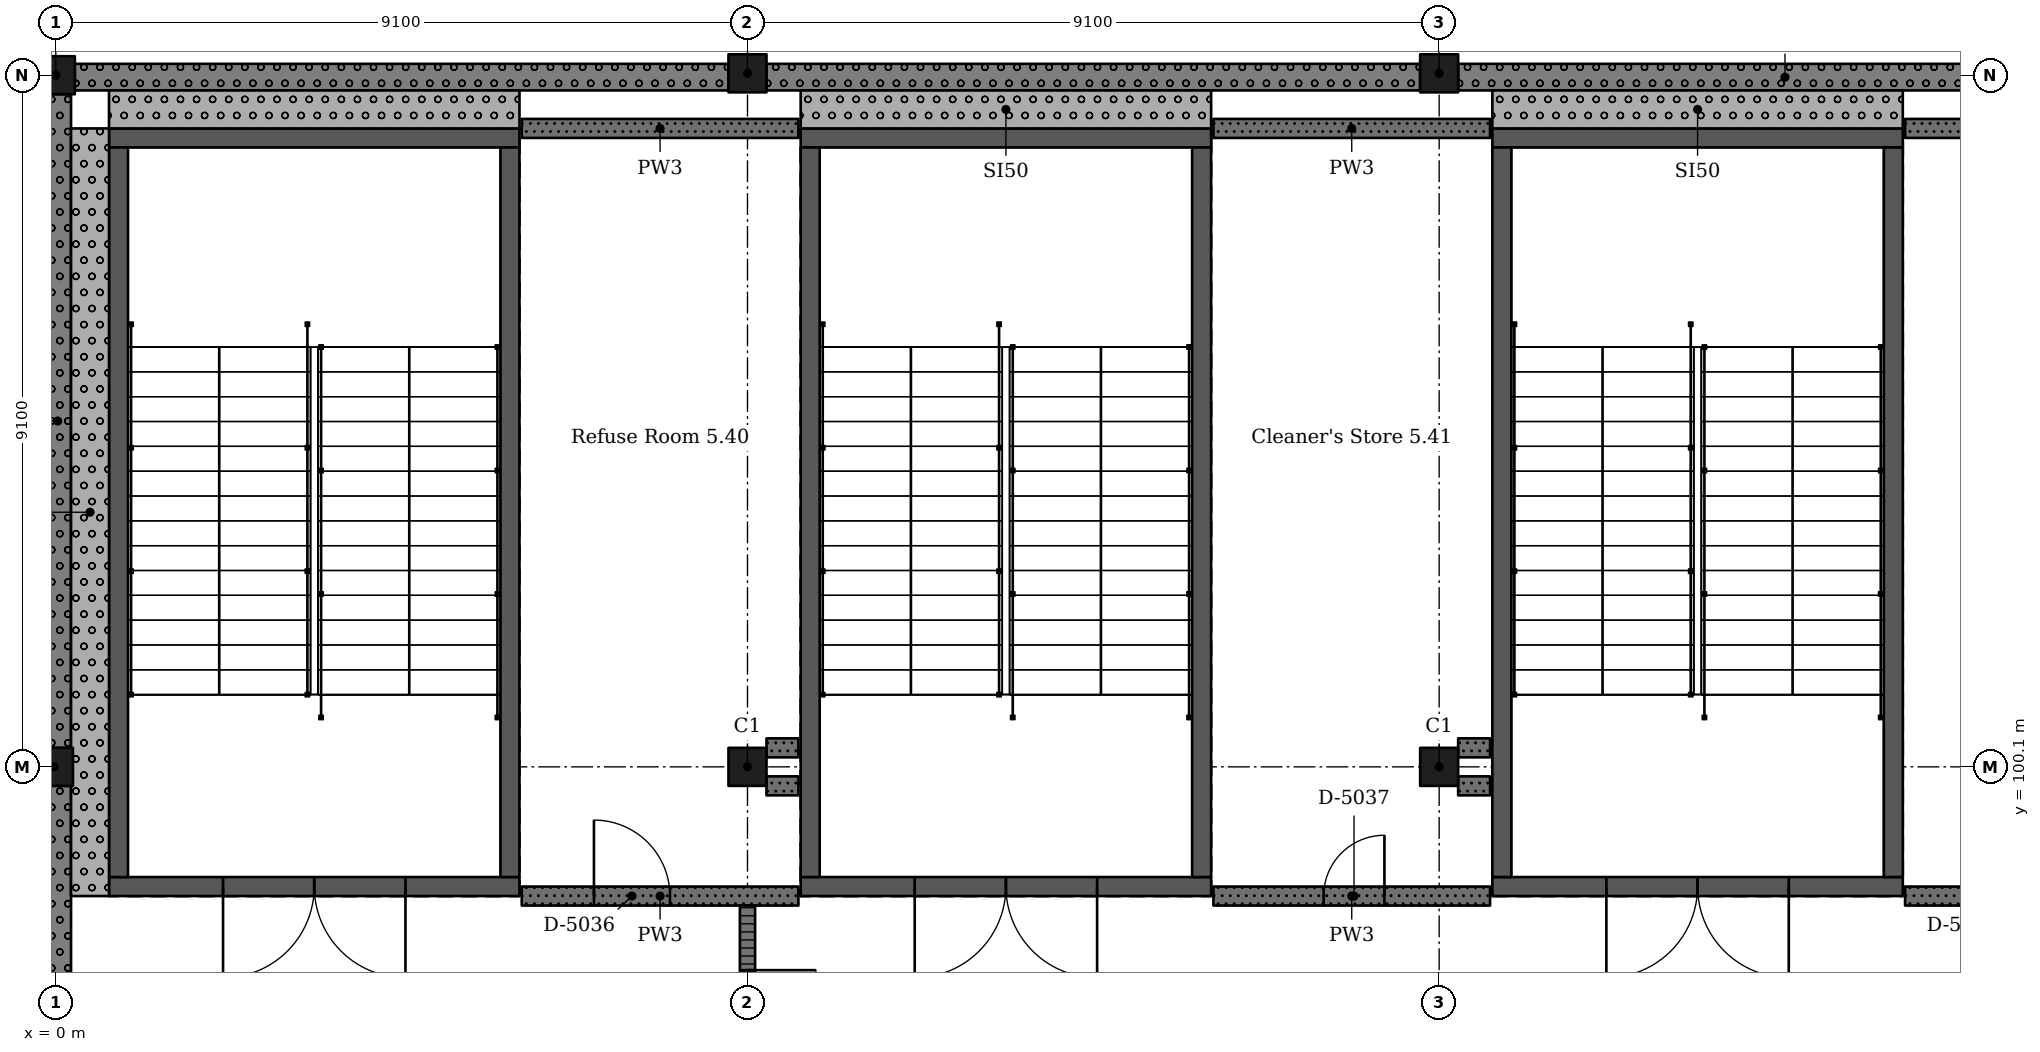
"""IFC4 building model, lengths in metres.
Left out: names, types, materials, properties, quantities, classifications, styles, units other than length and angle.
Written with IfcOpenShell. Run it as: python <this file> out.ifc"""

import sys

from ifc_helpers import new_model, si_unit, direction, frame, frame_2d, origin, origin_2d, place, context, subcontext, project, spatial, rectangle, extrude, element, fill, save


model = new_model("IFC4")
c1 = context("Model", 3, precision=1e-05, world=origin(), true_north=direction((0.0, 1.0)))
c2 = subcontext(c1, "Body", "Model", "MODEL_VIEW")
j1 = project(units=[si_unit("LENGTHUNIT", "METRE"), si_unit("PLANEANGLEUNIT", "RADIAN")], contexts=[c1])
p1 = place(None, origin())
s1 = spatial("IfcSite", under=j1, at=p1, CompositionType="ELEMENT")
p2 = place(p1, origin())
s2 = spatial("IfcBuilding", under=s1, at=p2, CompositionType="ELEMENT")
p3 = place(p2, frame((0.0, 0.0, 24.57)))
s3 = spatial("IfcBuildingStorey", under=s2, at=p3, CompositionType="ELEMENT", Elevation=24.57)
for number, where, z_axis, x_axis in (
    (1, (-0.025, 100.1, 0.0), (0.0, 0.0, 1.0), (1.0, 0.0, 0.0)),
    (2, (0.0, 109.2, 0.0), (0.0, 0.0, 1.0), (1.0, 0.0, 0.0)),
    (3, (9.1, 100.1, 0.0), (0.0, 0.0, 1.0), (1.0, 0.0, 0.0)),
    (4, (9.1, 109.225, 0.0), (0.0, 0.0, 1.0), (1.0, 0.0, 0.0)),
    (5, (18.2, 100.1, 0.0), (0.0, 0.0, 1.0), (1.0, 0.0, 0.0)),
    (6, (18.2, 109.225, 0.0), (0.0, 0.0, 1.0), (1.0, 0.0, 0.0)),
):
    element("IfcColumn", number, at=place(p3, frame(where, z_axis=z_axis, x_axis=x_axis)), inside=s3, PredefinedType="COLUMN", context=c2, shape_type="SweptSolid", body=[
        extrude(rectangle(XDim=0.5, YDim=0.5, at=origin_2d()), origin(), (0.0, 0.0, 1.0), 4.55),
    ])
p4 = place(p3, frame((6.1, 98.525, 0.0), z_axis=(0.0, 0.0, 1.0), x_axis=(-1.0, 0.0, 0.0)))
e7 = element("IfcWall", 7, at=p4, inside=s3, PredefinedType="SHEAR", context=c2, shape_type="SweptSolid", body=[
    extrude(rectangle(XDim=5.4, YDim=0.25, at=frame_2d((2.7, 0.0))), origin(), (0.0, 0.0, 1.0), 4.55),
])
p5 = place(p4, frame((1.5, 0.0, 0.0)))
e8 = element("IfcOpeningElement", 8, at=p5, cuts=e7, PredefinedType="OPENING", context=c2, shape_type="SweptSolid", body=[
    extrude(rectangle(XDim=2.4, YDim=2.1, at=frame_2d((1.2, 1.05))), frame((0.0, 0.135, 0.0), z_axis=(0.0, -1.0, 0.0), x_axis=(1.0, 0.0, 0.0)), (0.0, 0.0, 1.0), 0.27),
])
p6 = place(p3, frame((6.1, 108.375, 0.0), z_axis=(0.0, 0.0, 1.0), x_axis=(-1.0, 0.0, 0.0)))
e9 = element("IfcWall", 9, at=p6, inside=s3, PredefinedType="SHEAR", context=c2, shape_type="SweptSolid", body=[
    extrude(rectangle(XDim=5.4, YDim=0.25, at=frame_2d((2.7, 0.0))), origin(), (0.0, 0.0, 1.0), 4.55),
])
for number, where, z_axis, x_axis in (
    (10, (0.825, 108.25, 0.0), (0.0, 0.0, 1.0), (0.0, -1.0, 0.0)),
    (11, (5.975, 108.25, 0.0), (0.0, 0.0, 1.0), (0.0, -1.0, 0.0)),
):
    element("IfcWall", number, at=place(p3, frame(where, z_axis=z_axis, x_axis=x_axis)), inside=s3, PredefinedType="SHEAR", context=c2, shape_type="SweptSolid", body=[
        extrude(rectangle(XDim=9.6, YDim=0.25, at=frame_2d((4.8, 0.0))), origin(), (0.0, 0.0, 1.0), 4.55),
    ])
p7 = place(p3, frame((15.2, 98.525, 0.0), z_axis=(0.0, 0.0, 1.0), x_axis=(-1.0, 0.0, 0.0)))
e12 = element("IfcWall", 12, at=p7, inside=s3, PredefinedType="SHEAR", context=c2, shape_type="SweptSolid", body=[
    extrude(rectangle(XDim=5.4, YDim=0.25, at=frame_2d((2.7, 0.0))), origin(), (0.0, 0.0, 1.0), 4.55),
])
p8 = place(p7, frame((1.5, 0.0, 0.0)))
e13 = element("IfcOpeningElement", 13, at=p8, cuts=e12, PredefinedType="OPENING", context=c2, shape_type="SweptSolid", body=[
    extrude(rectangle(XDim=2.4, YDim=2.1, at=frame_2d((1.2, 1.05))), frame((0.0, 0.135, 0.0), z_axis=(0.0, -1.0, 0.0), x_axis=(1.0, 0.0, 0.0)), (0.0, 0.0, 1.0), 0.27),
])
p9 = place(p3, frame((15.2, 108.375, 0.0), z_axis=(0.0, 0.0, 1.0), x_axis=(-1.0, 0.0, 0.0)))
e14 = element("IfcWall", 14, at=p9, inside=s3, PredefinedType="SHEAR", context=c2, shape_type="SweptSolid", body=[
    extrude(rectangle(XDim=5.4, YDim=0.25, at=frame_2d((2.7, 0.0))), origin(), (0.0, 0.0, 1.0), 4.55),
])
for number, where, z_axis, x_axis in (
    (15, (9.925, 108.25, 0.0), (0.0, 0.0, 1.0), (0.0, -1.0, 0.0)),
    (16, (15.075, 108.25, 0.0), (0.0, 0.0, 1.0), (0.0, -1.0, 0.0)),
):
    element("IfcWall", number, at=place(p3, frame(where, z_axis=z_axis, x_axis=x_axis)), inside=s3, PredefinedType="SHEAR", context=c2, shape_type="SweptSolid", body=[
        extrude(rectangle(XDim=9.6, YDim=0.25, at=frame_2d((4.8, 0.0))), origin(), (0.0, 0.0, 1.0), 4.55),
    ])
p10 = place(p3, frame((24.3, 98.525, 0.0), z_axis=(0.0, 0.0, 1.0), x_axis=(-1.0, 0.0, 0.0)))
e17 = element("IfcWall", 17, at=p10, inside=s3, PredefinedType="SHEAR", context=c2, shape_type="SweptSolid", body=[
    extrude(rectangle(XDim=5.4, YDim=0.25, at=frame_2d((2.7, 0.0))), origin(), (0.0, 0.0, 1.0), 4.55),
])
p11 = place(p10, frame((1.5, 0.0, 0.0)))
e18 = element("IfcOpeningElement", 18, at=p11, cuts=e17, PredefinedType="OPENING", context=c2, shape_type="SweptSolid", body=[
    extrude(rectangle(XDim=2.4, YDim=2.1, at=frame_2d((1.2, 1.05))), frame((0.0, 0.135, 0.0), z_axis=(0.0, -1.0, 0.0), x_axis=(1.0, 0.0, 0.0)), (0.0, 0.0, 1.0), 0.27),
])
p12 = place(p3, frame((24.3, 108.375, 0.0), z_axis=(0.0, 0.0, 1.0), x_axis=(-1.0, 0.0, 0.0)))
e19 = element("IfcWall", 19, at=p12, inside=s3, PredefinedType="SHEAR", context=c2, shape_type="SweptSolid", body=[
    extrude(rectangle(XDim=5.4, YDim=0.25, at=frame_2d((2.7, 0.0))), origin(), (0.0, 0.0, 1.0), 4.55),
])
for number, where, z_axis, x_axis in (
    (20, (19.025, 108.25, 0.0), (0.0, 0.0, 1.0), (0.0, -1.0, 0.0)),
    (21, (24.175, 108.25, 0.0), (0.0, 0.0, 1.0), (0.0, -1.0, 0.0)),
):
    element("IfcWall", number, at=place(p3, frame(where, z_axis=z_axis, x_axis=x_axis)), inside=s3, PredefinedType="SHEAR", context=c2, shape_type="SweptSolid", body=[
        extrude(rectangle(XDim=9.6, YDim=0.25, at=frame_2d((4.8, 0.0))), origin(), (0.0, 0.0, 1.0), 4.55),
    ])
p13 = place(p3, frame((27.05, 109.175, 0.0), z_axis=(0.0, 0.0, 1.0), x_axis=(-1.0, 0.0, 0.0)))
e22 = element("IfcWall", 22, at=p13, inside=s3, PredefinedType="SOLIDWALL", context=c2, shape_type="SweptSolid", body=[
    extrude(rectangle(XDim=8.6, YDim=0.35, at=frame_2d((4.3, 0.0))), origin(), (0.0, 0.0, 1.0), 3.6),
])
p14 = place(p3, frame((17.95, 109.175, 0.0), z_axis=(0.0, 0.0, 1.0), x_axis=(-1.0, 0.0, 0.0)))
e23 = element("IfcWall", 23, at=p14, inside=s3, PredefinedType="SOLIDWALL", context=c2, shape_type="SweptSolid", body=[
    extrude(rectangle(XDim=8.6, YDim=0.35, at=frame_2d((4.3, 0.0))), origin(), (0.0, 0.0, 1.0), 3.6),
])
p15 = place(p3, frame((8.85, 109.175, 0.0), z_axis=(0.0, 0.0, 1.0), x_axis=(-1.0, 0.0, 0.0)))
e24 = element("IfcWall", 24, at=p15, inside=s3, PredefinedType="SOLIDWALL", context=c2, shape_type="SweptSolid", body=[
    extrude(rectangle(XDim=8.6, YDim=0.35, at=frame_2d((4.3, 0.0))), origin(), (0.0, 0.0, 1.0), 3.6),
])
p16 = place(p3, frame((0.025, 108.95, 0.0), z_axis=(0.0, 0.0, 1.0), x_axis=(0.0, -1.0, 0.0)))
e25 = element("IfcWall", 25, at=p16, inside=s3, PredefinedType="SOLIDWALL", context=c2, shape_type="SweptSolid", body=[
    extrude(rectangle(XDim=8.6, YDim=0.35, at=frame_2d((4.3, 0.0))), origin(), (0.0, 0.0, 1.0), 3.6),
])
p17 = place(p3, frame((0.025, 99.85, 0.0), z_axis=(0.0, 0.0, 1.0), x_axis=(0.0, -1.0, 0.0)))
e26 = element("IfcWall", 26, at=p17, inside=s3, PredefinedType="SOLIDWALL", context=c2, shape_type="SweptSolid", body=[
    extrude(rectangle(XDim=8.6, YDim=0.35, at=frame_2d((4.3, 0.0))), origin(), (0.0, 0.0, 1.0), 3.6),
])
p18 = place(p3, frame((0.7, 108.75, 0.0), z_axis=(0.0, 0.0, 1.0), x_axis=(1.0, 0.0, 0.0)))
e27 = element("IfcWall", 27, at=p18, inside=s3, PredefinedType="SOLIDWALL", context=c2, shape_type="SweptSolid", body=[
    extrude(rectangle(XDim=5.4, YDim=0.5, at=frame_2d((2.7, 0.0))), origin(), (0.0, 0.0, 1.0), 4.35),
])
p19 = place(p3, frame((0.45, 98.4, 0.0), z_axis=(0.0, 0.0, 1.0), x_axis=(0.0, 1.0, 0.0)))
e28 = element("IfcWall", 28, at=p19, inside=s3, PredefinedType="SOLIDWALL", context=c2, shape_type="SweptSolid", body=[
    extrude(rectangle(XDim=10.1, YDim=0.5, at=frame_2d((5.05, 0.0))), origin(), (0.0, 0.0, 1.0), 4.35),
])
p20 = place(p3, frame((9.8, 108.75, 0.0), z_axis=(0.0, 0.0, 1.0), x_axis=(1.0, 0.0, 0.0)))
e29 = element("IfcWall", 29, at=p20, inside=s3, PredefinedType="SOLIDWALL", context=c2, shape_type="SweptSolid", body=[
    extrude(rectangle(XDim=5.4, YDim=0.5, at=frame_2d((2.7, 0.0))), origin(), (0.0, 0.0, 1.0), 4.35),
])
p21 = place(p3, frame((18.9, 108.75, 0.0), z_axis=(0.0, 0.0, 1.0), x_axis=(1.0, 0.0, 0.0)))
e30 = element("IfcWall", 30, at=p21, inside=s3, PredefinedType="SOLIDWALL", context=c2, shape_type="SweptSolid", body=[
    extrude(rectangle(XDim=5.4, YDim=0.5, at=frame_2d((2.7, 0.0))), origin(), (0.0, 0.0, 1.0), 4.35),
])
p22 = place(p3, frame((6.13, 98.4, 0.0), z_axis=(0.0, 0.0, 1.0), x_axis=(1.0, 0.0, 0.0)))
e31 = element("IfcWall", 31, at=p22, inside=s3, PredefinedType="SOLIDWALL", context=c2, shape_type="SweptSolid", body=[
    extrude(rectangle(XDim=3.64, YDim=0.25, at=frame_2d((1.82, 0.0))), origin(), (0.0, 0.0, 1.0), 4.35),
])
p23 = place(p22, frame((0.95, 0.0, 0.0)))
e32 = element("IfcOpeningElement", 32, at=p23, cuts=e31, PredefinedType="OPENING", context=c2, shape_type="SweptSolid", body=[
    extrude(rectangle(XDim=1.0, YDim=2.1, at=frame_2d((0.5, 1.05))), frame((0.0, 0.135, 0.0), z_axis=(0.0, -1.0, 0.0), x_axis=(1.0, 0.0, 0.0)), (0.0, 0.0, 1.0), 0.27),
])
p24 = place(p3, frame((6.13, 108.5, 0.0), z_axis=(0.0, 0.0, 1.0), x_axis=(1.0, 0.0, 0.0)))
e33 = element("IfcWall", 33, at=p24, inside=s3, PredefinedType="SOLIDWALL", context=c2, shape_type="SweptSolid", body=[
    extrude(rectangle(XDim=3.64, YDim=0.25, at=frame_2d((1.82, 0.0))), origin(), (0.0, 0.0, 1.0), 4.35),
])
p25 = place(p3, frame((9.1, 98.275, 0.0), z_axis=(0.0, 0.0, 1.0), x_axis=(0.0, -1.0, 0.0)))
e34 = element("IfcWall", 34, at=p25, inside=s3, PredefinedType="PARTITIONING", context=c2, shape_type="SweptSolid", body=[
    extrude(rectangle(XDim=7.025, YDim=0.2, at=frame_2d((3.512, 0.0))), origin(), (0.0, 0.0, 1.0), 3.6),
])
p26 = place(p25, frame((0.85, 0.0, 0.0)))
e35 = element("IfcOpeningElement", 35, at=p26, cuts=e34, PredefinedType="OPENING", context=c2, shape_type="SweptSolid", body=[
    extrude(rectangle(XDim=1.8, YDim=2.4, at=frame_2d((0.9, 1.2))), frame((0.0, 0.11, 0.0), z_axis=(0.0, -1.0, 0.0), x_axis=(1.0, 0.0, 0.0)), (0.0, 0.0, 1.0), 0.22),
])
p27 = place(p25, frame((4.35, 0.0, 0.0)))
e36 = element("IfcOpeningElement", 36, at=p27, cuts=e34, PredefinedType="OPENING", context=c2, shape_type="SweptSolid", body=[
    extrude(rectangle(XDim=1.8, YDim=2.4, at=frame_2d((0.9, 1.2))), frame((0.0, 0.11, 0.0), z_axis=(0.0, -1.0, 0.0), x_axis=(1.0, 0.0, 0.0)), (0.0, 0.0, 1.0), 0.22),
])
for number, where, z_axis, x_axis in (
    (37, (9.35, 99.85, 0.0), (0.0, 0.0, 1.0), (1.0, 0.0, 0.0)),
    (38, (9.77, 100.35, 0.0), (0.0, 0.0, 1.0), (-1.0, 0.0, 0.0)),
):
    element("IfcWall", number, at=place(p3, frame(where, z_axis=z_axis, x_axis=x_axis)), inside=s3, PredefinedType="SOLIDWALL", context=c2, shape_type="SweptSolid", body=[
        extrude(rectangle(XDim=0.42, YDim=0.25, at=frame_2d((0.21, 0.0))), origin(), (0.0, 0.0, 1.0), 4.35),
    ])
p28 = place(p3, frame((15.23, 98.4, 0.0), z_axis=(0.0, 0.0, 1.0), x_axis=(1.0, 0.0, 0.0)))
e39 = element("IfcWall", 39, at=p28, inside=s3, PredefinedType="SOLIDWALL", context=c2, shape_type="SweptSolid", body=[
    extrude(rectangle(XDim=3.64, YDim=0.25, at=frame_2d((1.82, 0.0))), origin(), (0.0, 0.0, 1.0), 4.35),
])
p29 = place(p28, frame((1.45, 0.0, 0.0)))
e40 = element("IfcOpeningElement", 40, at=p29, cuts=e39, PredefinedType="OPENING", context=c2, shape_type="SweptSolid", body=[
    extrude(rectangle(XDim=0.8, YDim=2.1, at=frame_2d((0.4, 1.05))), frame((0.0, 0.135, 0.0), z_axis=(0.0, -1.0, 0.0), x_axis=(1.0, 0.0, 0.0)), (0.0, 0.0, 1.0), 0.27),
])
p30 = place(p3, frame((15.23, 108.5, 0.0), z_axis=(0.0, 0.0, 1.0), x_axis=(1.0, 0.0, 0.0)))
e41 = element("IfcWall", 41, at=p30, inside=s3, PredefinedType="SOLIDWALL", context=c2, shape_type="SweptSolid", body=[
    extrude(rectangle(XDim=3.64, YDim=0.25, at=frame_2d((1.82, 0.0))), origin(), (0.0, 0.0, 1.0), 4.35),
])
for number, where, z_axis, x_axis in (
    (42, (18.45, 99.85, 0.0), (0.0, 0.0, 1.0), (1.0, 0.0, 0.0)),
    (43, (18.87, 100.35, 0.0), (0.0, 0.0, 1.0), (-1.0, 0.0, 0.0)),
):
    element("IfcWall", number, at=place(p3, frame(where, z_axis=z_axis, x_axis=x_axis)), inside=s3, PredefinedType="SOLIDWALL", context=c2, shape_type="SweptSolid", body=[
        extrude(rectangle(XDim=0.42, YDim=0.25, at=frame_2d((0.21, 0.0))), origin(), (0.0, 0.0, 1.0), 4.35),
    ])
p31 = place(p3, frame((24.33, 98.4, 0.0), z_axis=(0.0, 0.0, 1.0), x_axis=(1.0, 0.0, 0.0)))
e44 = element("IfcWall", 44, at=p31, inside=s3, PredefinedType="SOLIDWALL", context=c2, shape_type="SweptSolid", body=[
    extrude(rectangle(XDim=3.64, YDim=0.25, at=frame_2d((1.82, 0.0))), origin(), (0.0, 0.0, 1.0), 4.35),
])
p32 = place(p31, frame((0.95, 0.0, 0.0)))
e45 = element("IfcOpeningElement", 45, at=p32, cuts=e44, PredefinedType="OPENING", context=c2, shape_type="SweptSolid", body=[
    extrude(rectangle(XDim=1.0, YDim=2.1, at=frame_2d((0.5, 1.05))), frame((0.0, 0.135, 0.0), z_axis=(0.0, -1.0, 0.0), x_axis=(1.0, 0.0, 0.0)), (0.0, 0.0, 1.0), 0.27),
])
p33 = place(p3, frame((24.33, 108.5, 0.0), z_axis=(0.0, 0.0, 1.0), x_axis=(1.0, 0.0, 0.0)))
e46 = element("IfcWall", 46, at=p33, inside=s3, PredefinedType="SOLIDWALL", context=c2, shape_type="SweptSolid", body=[
    extrude(rectangle(XDim=3.64, YDim=0.25, at=frame_2d((1.82, 0.0))), origin(), (0.0, 0.0, 1.0), 4.35),
])
p34 = place(p23, origin())
e47 = element("IfcDoor", 47, at=p34, inside=s3, OperationType="SINGLE_SWING_RIGHT", PredefinedType="DOOR", context=c2, shape_type="SweptSolid", body=[
    extrude(rectangle(XDim=1.0, YDim=2.1, at=frame_2d((0.5, 1.05))), frame((0.0, 0.025, 0.0), z_axis=(0.0, -1.0, 0.0), x_axis=(1.0, 0.0, 0.0)), (0.0, 0.0, 1.0), 0.05),
])
fill(e32, e47)
p35 = place(p29, origin())
e48 = element("IfcDoor", 48, at=p35, inside=s3, OperationType="SINGLE_SWING_LEFT", PredefinedType="DOOR", context=c2, shape_type="SweptSolid", body=[
    extrude(rectangle(XDim=0.8, YDim=2.1, at=frame_2d((0.4, 1.05))), frame((0.0, 0.025, 0.0), z_axis=(0.0, -1.0, 0.0), x_axis=(1.0, 0.0, 0.0)), (0.0, 0.0, 1.0), 0.05),
])
fill(e40, e48)
p36 = place(p26, origin())
e49 = element("IfcDoor", 49, at=p36, inside=s3, OperationType="DOUBLE_DOOR_SINGLE_SWING", PredefinedType="DOOR", context=c2, shape_type="SweptSolid", body=[
    extrude(rectangle(XDim=1.8, YDim=2.4, at=frame_2d((0.9, 1.2))), frame((0.0, 0.025, 0.0), z_axis=(0.0, -1.0, 0.0), x_axis=(1.0, 0.0, 0.0)), (0.0, 0.0, 1.0), 0.05),
])
fill(e35, e49)
p37 = place(p5, origin())
e50 = element("IfcDoor", 50, at=p37, inside=s3, OperationType="DOUBLE_DOOR_SINGLE_SWING", PredefinedType="DOOR", context=c2, shape_type="SweptSolid", body=[
    extrude(rectangle(XDim=2.4, YDim=2.1, at=frame_2d((1.2, 1.05))), frame((0.0, 0.025, 0.0), z_axis=(0.0, -1.0, 0.0), x_axis=(1.0, 0.0, 0.0)), (0.0, 0.0, 1.0), 0.05),
])
fill(e8, e50)
p38 = place(p8, origin())
e51 = element("IfcDoor", 51, at=p38, inside=s3, OperationType="DOUBLE_DOOR_SINGLE_SWING", PredefinedType="DOOR", context=c2, shape_type="SweptSolid", body=[
    extrude(rectangle(XDim=2.4, YDim=2.1, at=frame_2d((1.2, 1.05))), frame((0.0, 0.025, 0.0), z_axis=(0.0, -1.0, 0.0), x_axis=(1.0, 0.0, 0.0)), (0.0, 0.0, 1.0), 0.05),
])
fill(e13, e51)
p39 = place(p11, origin())
e52 = element("IfcDoor", 52, at=p39, inside=s3, OperationType="DOUBLE_DOOR_SINGLE_SWING", PredefinedType="DOOR", context=c2, shape_type="SweptSolid", body=[
    extrude(rectangle(XDim=2.4, YDim=2.1, at=frame_2d((1.2, 1.05))), frame((0.0, 0.025, 0.0), z_axis=(0.0, -1.0, 0.0), x_axis=(1.0, 0.0, 0.0)), (0.0, 0.0, 1.0), 0.05),
])
fill(e18, e52)
save(model, sys.argv[1])
